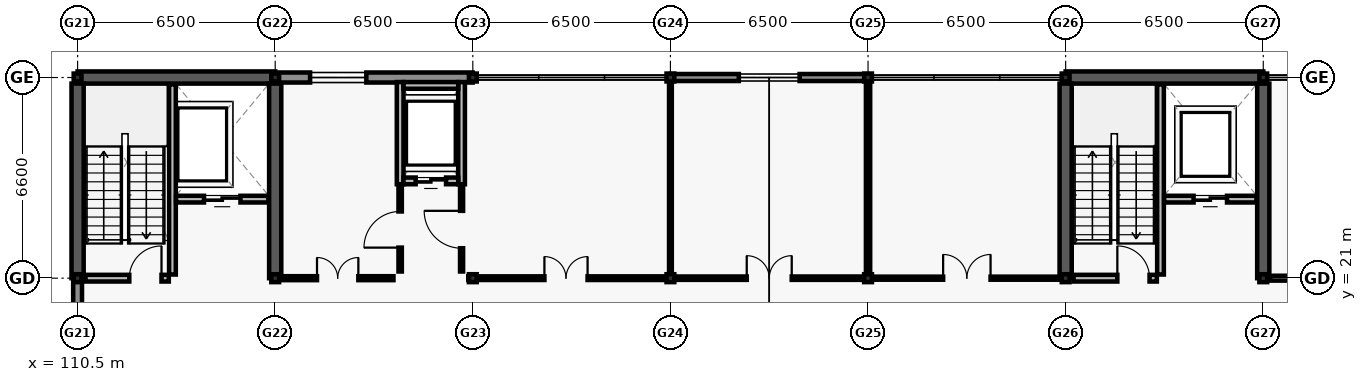
"""IFC4 building model, lengths in metres.
Left out: names, types, materials, properties, quantities, classifications, styles, units other than length and angle.
Written with IfcOpenShell. Run it as: python <this file> out.ifc"""

import sys

from ifc_helpers import new_model, si_unit, direction, frame, frame_2d, origin, origin_2d, place, context, subcontext, project, spatial, rectangle, i_section, extrude, element, fill, save


model = new_model("IFC4")
c1 = context("Model", 3, precision=1e-05, world=origin(), true_north=direction((0.0, 1.0)))
c2 = subcontext(c1, "Body", "Model", "MODEL_VIEW")
j1 = project(units=[si_unit("LENGTHUNIT", "METRE"), si_unit("PLANEANGLEUNIT", "RADIAN")], contexts=[c1])
p1 = place(None, origin())
s1 = spatial("IfcSite", under=j1, at=p1, CompositionType="ELEMENT")
p2 = place(p1, origin())
s2 = spatial("IfcBuilding", under=s1, at=p2, CompositionType="ELEMENT")
p3 = place(p2, frame((0.0, 0.0, 17.4)))
s3 = spatial("IfcBuildingStorey", under=s2, at=p3, CompositionType="ELEMENT", Elevation=17.4)
for number, where, z_axis, x_axis in (
    (1, (110.5, 21.0, 0.0), (0.0, 0.0, 1.0), (1.0, 0.0, 0.0)),
    (2, (110.5, 27.6, 0.0), (0.0, 0.0, 1.0), (1.0, 0.0, 0.0)),
    (3, (117.0, 21.0, 0.0), (0.0, 0.0, 1.0), (1.0, 0.0, 0.0)),
    (4, (117.0, 27.6, 0.0), (0.0, 0.0, 1.0), (1.0, 0.0, 0.0)),
    (5, (123.5, 21.0, 0.0), (0.0, 0.0, 1.0), (1.0, 0.0, 0.0)),
    (6, (123.5, 27.6, 0.0), (0.0, 0.0, 1.0), (1.0, 0.0, 0.0)),
    (7, (130.0, 21.0, 0.0), (0.0, 0.0, 1.0), (1.0, 0.0, 0.0)),
    (8, (130.0, 27.6, 0.0), (0.0, 0.0, 1.0), (1.0, 0.0, 0.0)),
    (9, (136.5, 21.0, 0.0), (0.0, 0.0, 1.0), (1.0, 0.0, 0.0)),
    (10, (136.5, 27.6, 0.0), (0.0, 0.0, 1.0), (1.0, 0.0, 0.0)),
    (11, (143.0, 21.0, 0.0), (0.0, 0.0, 1.0), (1.0, 0.0, 0.0)),
    (12, (143.0, 27.6, 0.0), (0.0, 0.0, 1.0), (1.0, 0.0, 0.0)),
    (13, (149.5, 21.0, 0.0), (0.0, 0.0, 1.0), (1.0, 0.0, 0.0)),
    (14, (149.5, 27.6, 0.0), (0.0, 0.0, 1.0), (1.0, 0.0, 0.0)),
):
    element("IfcColumn", number, at=place(p3, frame(where, z_axis=z_axis, x_axis=x_axis)), inside=s3, PredefinedType="COLUMN", context=c2, shape_type="SweptSolid", body=[
        extrude(i_section(OverallWidth=0.256, OverallDepth=0.26, WebThickness=0.01, FlangeThickness=0.017, FilletRadius=0.013, at=origin_2d()), origin(), (0.0, 0.0, 1.0), 3.9),
    ])
p4 = place(p3, frame((110.5, 27.6, 0.0), z_axis=(0.0, 0.0, 1.0), x_axis=(1.0, 0.0, 0.0)))
e15 = element("IfcWall", 15, at=p4, inside=s3, PredefinedType="SHEAR", context=c2, shape_type="SweptSolid", body=[
    extrude(rectangle(XDim=6.5, YDim=0.4, at=frame_2d((3.25, 0.0))), origin(), (0.0, 0.0, 1.0), 3.66),
])
for number, where, z_axis, x_axis in (
    (16, (110.5, 21.0, 0.0), (0.0, 0.0, 1.0), (0.0, 1.0, 0.0)),
    (17, (117.0, 21.0, 0.0), (0.0, 0.0, 1.0), (0.0, 1.0, 0.0)),
):
    element("IfcWall", number, at=place(p3, frame(where, z_axis=z_axis, x_axis=x_axis)), inside=s3, PredefinedType="SHEAR", context=c2, shape_type="SweptSolid", body=[
        extrude(rectangle(XDim=6.4, YDim=0.4, at=frame_2d((3.2, 0.0))), origin(), (0.0, 0.0, 1.0), 3.66),
    ])
p5 = place(p3, frame((143.0, 27.6, 0.0), z_axis=(0.0, 0.0, 1.0), x_axis=(1.0, 0.0, 0.0)))
e18 = element("IfcWall", 18, at=p5, inside=s3, PredefinedType="SHEAR", context=c2, shape_type="SweptSolid", body=[
    extrude(rectangle(XDim=6.5, YDim=0.4, at=frame_2d((3.25, 0.0))), origin(), (0.0, 0.0, 1.0), 3.66),
])
for number, where, z_axis, x_axis in (
    (19, (143.0, 21.0, 0.0), (0.0, 0.0, 1.0), (0.0, 1.0, 0.0)),
    (20, (149.5, 21.0, 0.0), (0.0, 0.0, 1.0), (0.0, 1.0, 0.0)),
):
    element("IfcWall", number, at=place(p3, frame(where, z_axis=z_axis, x_axis=x_axis)), inside=s3, PredefinedType="SHEAR", context=c2, shape_type="SweptSolid", body=[
        extrude(rectangle(XDim=6.4, YDim=0.4, at=frame_2d((3.2, 0.0))), origin(), (0.0, 0.0, 1.0), 3.66),
    ])
p6 = place(p3, frame((117.005, 27.6, 0.0), z_axis=(0.0, 0.0, 1.0), x_axis=(1.0, 0.0, 0.0)))
e21 = element("IfcWall", 21, at=p6, inside=s3, PredefinedType="SOLIDWALL", context=c2, shape_type="SweptSolid", body=[
    extrude(rectangle(XDim=6.49, YDim=0.33, at=frame_2d((3.245, 0.0))), origin(), (0.0, 0.0, 1.0), 3.02),
])
p7 = place(p6, frame((1.143, 0.0, 0.8)))
e22 = element("IfcOpeningElement", 22, at=p7, cuts=e21, PredefinedType="OPENING", context=c2, shape_type="SweptSolid", body=[
    extrude(rectangle(XDim=1.85, YDim=1.55, at=frame_2d((0.925, 0.775))), frame((0.0, 0.175, 0.0), z_axis=(0.0, -1.0, 0.0), x_axis=(1.0, 0.0, 0.0)), (0.0, 0.0, 1.0), 0.35),
])
p8 = place(p3, frame((130.005, 27.6, 0.0), z_axis=(0.0, 0.0, 1.0), x_axis=(1.0, 0.0, 0.0)))
e23 = element("IfcWall", 23, at=p8, inside=s3, PredefinedType="SOLIDWALL", context=c2, shape_type="SweptSolid", body=[
    extrude(rectangle(XDim=6.49, YDim=0.23, at=frame_2d((3.245, 0.0))), origin(), (0.0, 0.0, 1.0), 3.02),
])
p9 = place(p8, frame((2.245, 0.0, 0.8)))
e24 = element("IfcOpeningElement", 24, at=p9, cuts=e23, PredefinedType="OPENING", context=c2, shape_type="SweptSolid", body=[
    extrude(rectangle(XDim=2.0, YDim=1.55, at=frame_2d((1.0, 0.775))), frame((0.0, 0.125, 0.0), z_axis=(0.0, -1.0, 0.0), x_axis=(1.0, 0.0, 0.0)), (0.0, 0.0, 1.0), 0.25),
])
p10 = place(p3, frame((110.5, 14.405, 0.0), z_axis=(0.0, 0.0, 1.0), x_axis=(0.0, 1.0, 0.0)))
e25 = element("IfcWall", 25, at=p10, inside=s3, PredefinedType="SOLIDWALL", context=c2, shape_type="SweptSolid", body=[
    extrude(rectangle(XDim=6.59, YDim=0.29, at=frame_2d((3.295, 0.0))), origin(), (0.0, 0.0, 1.0), 3.02),
])
p11 = place(p10, frame((0.762, 0.0, 0.8)))
e26 = element("IfcOpeningElement", 26, at=p11, cuts=e25, PredefinedType="OPENING", context=c2, shape_type="SweptSolid", body=[
    extrude(rectangle(XDim=2.3, YDim=1.55, at=frame_2d((1.15, 0.775))), frame((0.0, 0.155, 0.0), z_axis=(0.0, -1.0, 0.0), x_axis=(1.0, 0.0, 0.0)), (0.0, 0.0, 1.0), 0.31),
])
p12 = place(p3, frame((113.62, 21.12, 0.0), z_axis=(0.0, 0.0, 1.0), x_axis=(0.0, 1.0, 0.0)))
e27 = element("IfcWall", 27, at=p12, inside=s3, PredefinedType="SOLIDWALL", context=c2, shape_type="SweptSolid", body=[
    extrude(rectangle(XDim=6.255, YDim=0.22, at=frame_2d((3.127, 0.0))), origin(), (0.0, 0.0, 1.0), 3.66),
])
p13 = place(p3, frame((110.76, 21.0, 0.0), z_axis=(0.0, 0.0, 1.0), x_axis=(1.0, 0.0, 0.0)))
e28 = element("IfcWall", 28, at=p13, inside=s3, PredefinedType="SOLIDWALL", context=c2, shape_type="SweptSolid", body=[
    extrude(rectangle(XDim=2.74, YDim=0.22, at=frame_2d((1.37, 0.0))), origin(), (0.0, 0.0, 1.0), 3.02),
])
p14 = place(p13, frame((1.44, 0.0, 0.0)))
e29 = element("IfcOpeningElement", 29, at=p14, cuts=e28, PredefinedType="OPENING", context=c2, shape_type="SweptSolid", body=[
    extrude(rectangle(XDim=1.06, YDim=2.1, at=frame_2d((0.53, 1.05))), frame((0.0, 0.12, 0.0), z_axis=(0.0, -1.0, 0.0), x_axis=(1.0, 0.0, 0.0)), (0.0, 0.0, 1.0), 0.24),
])
p15 = place(p3, frame((113.74, 23.6, 0.0), z_axis=(0.0, 0.0, 1.0), x_axis=(1.0, 0.0, 0.0)))
e30 = element("IfcWall", 30, at=p15, inside=s3, PredefinedType="SOLIDWALL", context=c2, shape_type="SweptSolid", body=[
    extrude(rectangle(XDim=3.035, YDim=0.22, at=frame_2d((1.518, 0.0))), origin(), (0.0, 0.0, 1.0), 3.66),
])
p16 = place(p15, frame((0.917, 0.0, 0.0)))
e31 = element("IfcOpeningElement", 31, at=p16, cuts=e30, PredefinedType="OPENING", context=c2, shape_type="SweptSolid", body=[
    extrude(rectangle(XDim=1.2, YDim=2.15, at=frame_2d((0.6, 1.075))), frame((0.0, 0.12, 0.0), z_axis=(0.0, -1.0, 0.0), x_axis=(1.0, 0.0, 0.0)), (0.0, 0.0, 1.0), 0.24),
])
for number, where, z_axis, x_axis in (
    (32, (121.11, 24.09, 0.0), (0.0, 0.0, 1.0), (0.0, 1.0, 0.0)),
    (33, (123.13, 24.09, 0.0), (0.0, 0.0, 1.0), (0.0, 1.0, 0.0)),
):
    element("IfcWall", number, at=place(p3, frame(where, z_axis=z_axis, x_axis=x_axis)), inside=s3, PredefinedType="SOLIDWALL", context=c2, shape_type="SweptSolid", body=[
        extrude(rectangle(XDim=3.36, YDim=0.22, at=frame_2d((1.68, 0.0))), origin(), (0.0, 0.0, 1.0), 3.66),
    ])
p17 = place(p3, frame((121.22, 27.34, 0.0), z_axis=(0.0, 0.0, 1.0), x_axis=(1.0, 0.0, 0.0)))
e34 = element("IfcWall", 34, at=p17, inside=s3, PredefinedType="SOLIDWALL", context=c2, shape_type="SweptSolid", body=[
    extrude(rectangle(XDim=1.8, YDim=0.22, at=frame_2d((0.9, 0.0))), origin(), (0.0, 0.0, 1.0), 3.66),
])
p18 = place(p3, frame((121.22, 24.2, 0.0), z_axis=(0.0, 0.0, 1.0), x_axis=(1.0, 0.0, 0.0)))
e35 = element("IfcWall", 35, at=p18, inside=s3, PredefinedType="SOLIDWALL", context=c2, shape_type="SweptSolid", body=[
    extrude(rectangle(XDim=1.8, YDim=0.22, at=frame_2d((0.9, 0.0))), origin(), (0.0, 0.0, 1.0), 3.66),
])
p19 = place(p18, frame((0.4, 0.0, 0.0)))
e36 = element("IfcOpeningElement", 36, at=p19, cuts=e35, PredefinedType="OPENING", context=c2, shape_type="SweptSolid", body=[
    extrude(rectangle(XDim=1.0, YDim=2.1, at=frame_2d((0.5, 1.05))), frame((0.0, 0.12, 0.0), z_axis=(0.0, -1.0, 0.0), x_axis=(1.0, 0.0, 0.0)), (0.0, 0.0, 1.0), 0.24),
])
p20 = place(p3, frame((146.12, 21.12, 0.0), z_axis=(0.0, 0.0, 1.0), x_axis=(0.0, 1.0, 0.0)))
e37 = element("IfcWall", 37, at=p20, inside=s3, PredefinedType="SOLIDWALL", context=c2, shape_type="SweptSolid", body=[
    extrude(rectangle(XDim=6.255, YDim=0.22, at=frame_2d((3.127, 0.0))), origin(), (0.0, 0.0, 1.0), 3.66),
])
p21 = place(p3, frame((143.26, 21.0, 0.0), z_axis=(0.0, 0.0, 1.0), x_axis=(1.0, 0.0, 0.0)))
e38 = element("IfcWall", 38, at=p21, inside=s3, PredefinedType="SOLIDWALL", context=c2, shape_type="SweptSolid", body=[
    extrude(rectangle(XDim=2.74, YDim=0.22, at=frame_2d((1.37, 0.0))), origin(), (0.0, 0.0, 1.0), 3.02),
])
p22 = place(p21, frame((1.44, 0.0, 0.0)))
e39 = element("IfcOpeningElement", 39, at=p22, cuts=e38, PredefinedType="OPENING", context=c2, shape_type="SweptSolid", body=[
    extrude(rectangle(XDim=1.06, YDim=2.1, at=frame_2d((0.53, 1.05))), frame((0.0, 0.12, 0.0), z_axis=(0.0, -1.0, 0.0), x_axis=(1.0, 0.0, 0.0)), (0.0, 0.0, 1.0), 0.24),
])
p23 = place(p3, frame((146.24, 23.6, 0.0), z_axis=(0.0, 0.0, 1.0), x_axis=(1.0, 0.0, 0.0)))
e40 = element("IfcWall", 40, at=p23, inside=s3, PredefinedType="SOLIDWALL", context=c2, shape_type="SweptSolid", body=[
    extrude(rectangle(XDim=3.035, YDim=0.22, at=frame_2d((1.518, 0.0))), origin(), (0.0, 0.0, 1.0), 3.66),
])
p24 = place(p23, frame((0.968, 0.0, 0.0)))
e41 = element("IfcOpeningElement", 41, at=p24, cuts=e40, PredefinedType="OPENING", context=c2, shape_type="SweptSolid", body=[
    extrude(rectangle(XDim=1.1, YDim=2.1, at=frame_2d((0.55, 1.05))), frame((0.0, 0.12, 0.0), z_axis=(0.0, -1.0, 0.0), x_axis=(1.0, 0.0, 0.0)), (0.0, 0.0, 1.0), 0.24),
])
p25 = place(p3, frame((121.11, 21.22, 0.0), z_axis=(0.0, 0.0, 1.0), x_axis=(0.0, 1.0, 0.0)))
e42 = element("IfcWall", 42, at=p25, inside=s3, PredefinedType="PARTITIONING", context=c2, shape_type="SweptSolid", body=[
    extrude(rectangle(XDim=2.76, YDim=0.11, at=frame_2d((1.38, 0.0))), origin(), (0.0, 0.0, 1.0), 3.0),
])
p26 = place(p25, frame((0.785, 0.0, 0.0)))
e43 = element("IfcOpeningElement", 43, at=p26, cuts=e42, PredefinedType="OPENING", context=c2, shape_type="SweptSolid", body=[
    extrude(rectangle(XDim=1.19, YDim=2.14, at=frame_2d((0.595, 1.07))), frame((0.0, 0.065, 0.0), z_axis=(0.0, -1.0, 0.0), x_axis=(1.0, 0.0, 0.0)), (0.0, 0.0, 1.0), 0.13),
])
p27 = place(p3, frame((123.13, 21.22, 0.0), z_axis=(0.0, 0.0, 1.0), x_axis=(0.0, 1.0, 0.0)))
e44 = element("IfcWall", 44, at=p27, inside=s3, PredefinedType="PARTITIONING", context=c2, shape_type="SweptSolid", body=[
    extrude(rectangle(XDim=2.76, YDim=0.1, at=frame_2d((1.38, 0.0))), origin(), (0.0, 0.0, 1.0), 3.0),
])
p28 = place(p27, frame((0.765, 0.0, 0.0)))
e45 = element("IfcOpeningElement", 45, at=p28, cuts=e44, PredefinedType="OPENING", context=c2, shape_type="SweptSolid", body=[
    extrude(rectangle(XDim=1.23, YDim=2.08, at=frame_2d((0.615, 1.04))), frame((0.0, 0.06, 0.0), z_axis=(0.0, -1.0, 0.0), x_axis=(1.0, 0.0, 0.0)), (0.0, 0.0, 1.0), 0.12),
])
p29 = place(p3, frame((117.22, 21.0, 0.0), z_axis=(0.0, 0.0, 1.0), x_axis=(1.0, 0.0, 0.0)))
e46 = element("IfcWall", 46, at=p29, inside=s3, PredefinedType="PARTITIONING", context=c2, shape_type="SweptSolid", body=[
    extrude(rectangle(XDim=3.67, YDim=0.13, at=frame_2d((1.835, 0.0))), origin(), (0.0, 0.0, 1.0), 3.0),
])
p30 = place(p29, frame((1.155, 0.0, 0.0)))
e47 = element("IfcOpeningElement", 47, at=p30, cuts=e46, PredefinedType="OPENING", context=c2, shape_type="SweptSolid", body=[
    extrude(rectangle(XDim=1.36, YDim=2.15, at=frame_2d((0.68, 1.075))), frame((0.0, 0.075, 0.0), z_axis=(0.0, -1.0, 0.0), x_axis=(1.0, 0.0, 0.0)), (0.0, 0.0, 1.0), 0.15),
])
p31 = place(p3, frame((123.35, 21.0, 0.0), z_axis=(0.0, 0.0, 1.0), x_axis=(1.0, 0.0, 0.0)))
e48 = element("IfcWall", 48, at=p31, inside=s3, PredefinedType="PARTITIONING", context=c2, shape_type="SweptSolid", body=[
    extrude(rectangle(XDim=6.43, YDim=0.12, at=frame_2d((3.215, 0.0))), origin(), (0.0, 0.0, 1.0), 3.0),
])
p32 = place(p31, frame((2.505, 0.0, 0.0)))
e49 = element("IfcOpeningElement", 49, at=p32, cuts=e48, PredefinedType="OPENING", context=c2, shape_type="SweptSolid", body=[
    extrude(rectangle(XDim=1.42, YDim=2.15, at=frame_2d((0.71, 1.075))), frame((0.0, 0.07, 0.0), z_axis=(0.0, -1.0, 0.0), x_axis=(1.0, 0.0, 0.0)), (0.0, 0.0, 1.0), 0.14),
])
p33 = place(p3, frame((130.22, 21.0, 0.0), z_axis=(0.0, 0.0, 1.0), x_axis=(1.0, 0.0, 0.0)))
e50 = element("IfcWall", 50, at=p33, inside=s3, PredefinedType="PARTITIONING", context=c2, shape_type="SweptSolid", body=[
    extrude(rectangle(XDim=6.06, YDim=0.11, at=frame_2d((3.03, 0.0))), origin(), (0.0, 0.0, 1.0), 3.0),
])
p34 = place(p33, frame((2.29, 0.0, 0.0)))
e51 = element("IfcOpeningElement", 51, at=p34, cuts=e50, PredefinedType="OPENING", context=c2, shape_type="SweptSolid", body=[
    extrude(rectangle(XDim=1.48, YDim=2.18, at=frame_2d((0.74, 1.09))), frame((0.0, 0.065, 0.0), z_axis=(0.0, -1.0, 0.0), x_axis=(1.0, 0.0, 0.0)), (0.0, 0.0, 1.0), 0.13),
])
p35 = place(p3, frame((136.72, 21.0, 0.0), z_axis=(0.0, 0.0, 1.0), x_axis=(1.0, 0.0, 0.0)))
e52 = element("IfcWall", 52, at=p35, inside=s3, PredefinedType="PARTITIONING", context=c2, shape_type="SweptSolid", body=[
    extrude(rectangle(XDim=6.06, YDim=0.1, at=frame_2d((3.03, 0.0))), origin(), (0.0, 0.0, 1.0), 3.0),
])
p36 = place(p35, frame((2.25, 0.0, 0.0)))
e53 = element("IfcOpeningElement", 53, at=p36, cuts=e52, PredefinedType="OPENING", context=c2, shape_type="SweptSolid", body=[
    extrude(rectangle(XDim=1.56, YDim=2.18, at=frame_2d((0.78, 1.09))), frame((0.0, 0.06, 0.0), z_axis=(0.0, -1.0, 0.0), x_axis=(1.0, 0.0, 0.0)), (0.0, 0.0, 1.0), 0.12),
])
p37 = place(p3, frame((149.72, 21.0, 0.0), z_axis=(0.0, 0.0, 1.0), x_axis=(1.0, 0.0, 0.0)))
e54 = element("IfcWall", 54, at=p37, inside=s3, PredefinedType="PARTITIONING", context=c2, shape_type="SweptSolid", body=[
    extrude(rectangle(XDim=6.06, YDim=0.16, at=frame_2d((3.03, 0.0))), origin(), (0.0, 0.0, 1.0), 3.0),
])
p38 = place(p37, frame((2.21, 0.0, 0.0)))
e55 = element("IfcOpeningElement", 55, at=p38, cuts=e54, PredefinedType="OPENING", context=c2, shape_type="SweptSolid", body=[
    extrude(rectangle(XDim=1.64, YDim=2.2, at=frame_2d((0.82, 1.1))), frame((0.0, 0.09, 0.0), z_axis=(0.0, -1.0, 0.0), x_axis=(1.0, 0.0, 0.0)), (0.0, 0.0, 1.0), 0.18),
])
p39 = place(p3, frame((130.0, 21.22, 0.0), z_axis=(0.0, 0.0, 1.0), x_axis=(0.0, 1.0, 0.0)))
e56 = element("IfcWall", 56, at=p39, inside=s3, PredefinedType="MOVABLE", context=c2, shape_type="SweptSolid", body=[
    extrude(rectangle(XDim=6.16, YDim=0.09, at=frame_2d((3.08, 0.0))), origin(), (0.0, 0.0, 1.0), 3.0),
])
p40 = place(p3, frame((136.5, 21.22, 0.0), z_axis=(0.0, 0.0, 1.0), x_axis=(0.0, 1.0, 0.0)))
e57 = element("IfcWall", 57, at=p40, inside=s3, PredefinedType="PARTITIONING", context=c2, shape_type="SweptSolid", body=[
    extrude(rectangle(XDim=6.16, YDim=0.14, at=frame_2d((3.08, 0.0))), origin(), (0.0, 0.0, 1.0), 3.0),
])
p41 = place(p7, origin())
e58 = element("IfcWindow", 58, at=p41, inside=s3, PartitioningType="DOUBLE_PANEL_VERTICAL", PredefinedType="WINDOW", context=c2, shape_type="SweptSolid", body=[
    extrude(rectangle(XDim=1.85, YDim=1.55, at=frame_2d((0.925, 0.775))), frame((0.0, 0.03, 0.0), z_axis=(0.0, -1.0, 0.0), x_axis=(1.0, 0.0, 0.0)), (0.0, 0.0, 1.0), 0.06),
])
fill(e22, e58)
p42 = place(p9, origin())
e59 = element("IfcWindow", 59, at=p42, inside=s3, PartitioningType="DOUBLE_PANEL_VERTICAL", PredefinedType="WINDOW", context=c2, shape_type="SweptSolid", body=[
    extrude(rectangle(XDim=2.0, YDim=1.55, at=frame_2d((1.0, 0.775))), frame((0.0, 0.03, 0.0), z_axis=(0.0, -1.0, 0.0), x_axis=(1.0, 0.0, 0.0)), (0.0, 0.0, 1.0), 0.06),
])
fill(e24, e59)
p43 = place(p14, origin())
e60 = element("IfcDoor", 60, at=p43, inside=s3, OperationType="SINGLE_SWING_RIGHT", PredefinedType="DOOR", context=c2, shape_type="SweptSolid", body=[
    extrude(rectangle(XDim=1.06, YDim=2.1, at=frame_2d((0.53, 1.05))), frame((0.0, 0.025, 0.0), z_axis=(0.0, -1.0, 0.0), x_axis=(1.0, 0.0, 0.0)), (0.0, 0.0, 1.0), 0.05),
])
fill(e29, e60)
p44 = place(p16, origin())
e61 = element("IfcDoor", 61, at=p44, inside=s3, OperationType="DOUBLE_DOOR_SLIDING", PredefinedType="DOOR", context=c2, shape_type="SweptSolid", body=[
    extrude(rectangle(XDim=1.2, YDim=2.15, at=frame_2d((0.6, 1.075))), frame((0.0, 0.025, 0.0), z_axis=(0.0, -1.0, 0.0), x_axis=(1.0, 0.0, 0.0)), (0.0, 0.0, 1.0), 0.05),
])
fill(e31, e61)
p45 = place(p19, origin())
e62 = element("IfcDoor", 62, at=p45, inside=s3, OperationType="DOUBLE_DOOR_SLIDING", PredefinedType="DOOR", context=c2, shape_type="SweptSolid", body=[
    extrude(rectangle(XDim=1.0, YDim=2.1, at=frame_2d((0.5, 1.05))), frame((0.0, 0.025, 0.0), z_axis=(0.0, -1.0, 0.0), x_axis=(1.0, 0.0, 0.0)), (0.0, 0.0, 1.0), 0.05),
])
fill(e36, e62)
p46 = place(p22, origin())
e63 = element("IfcDoor", 63, at=p46, inside=s3, OperationType="SINGLE_SWING_LEFT", PredefinedType="DOOR", context=c2, shape_type="SweptSolid", body=[
    extrude(rectangle(XDim=1.06, YDim=2.1, at=frame_2d((0.53, 1.05))), frame((0.0, 0.025, 0.0), z_axis=(0.0, -1.0, 0.0), x_axis=(1.0, 0.0, 0.0)), (0.0, 0.0, 1.0), 0.05),
])
fill(e39, e63)
p47 = place(p24, origin())
e64 = element("IfcDoor", 64, at=p47, inside=s3, OperationType="DOUBLE_DOOR_SLIDING", PredefinedType="DOOR", context=c2, shape_type="SweptSolid", body=[
    extrude(rectangle(XDim=1.1, YDim=2.1, at=frame_2d((0.55, 1.05))), frame((0.0, 0.025, 0.0), z_axis=(0.0, -1.0, 0.0), x_axis=(1.0, 0.0, 0.0)), (0.0, 0.0, 1.0), 0.05),
])
fill(e41, e64)
p48 = place(p26, origin())
e65 = element("IfcDoor", 65, at=p48, inside=s3, OperationType="SINGLE_SWING_LEFT", PredefinedType="DOOR", context=c2, shape_type="SweptSolid", body=[
    extrude(rectangle(XDim=1.19, YDim=2.14, at=frame_2d((0.595, 1.07))), frame((0.0, 0.025, 0.0), z_axis=(0.0, -1.0, 0.0), x_axis=(1.0, 0.0, 0.0)), (0.0, 0.0, 1.0), 0.05),
])
fill(e43, e65)
p49 = place(p28, origin())
e66 = element("IfcDoor", 66, at=p49, inside=s3, OperationType="SINGLE_SWING_RIGHT", PredefinedType="DOOR", context=c2, shape_type="SweptSolid", body=[
    extrude(rectangle(XDim=1.23, YDim=2.08, at=frame_2d((0.615, 1.04))), frame((0.0, 0.025, 0.0), z_axis=(0.0, -1.0, 0.0), x_axis=(1.0, 0.0, 0.0)), (0.0, 0.0, 1.0), 0.05),
])
fill(e45, e66)
p50 = place(p30, origin())
e67 = element("IfcDoor", 67, at=p50, inside=s3, OperationType="DOUBLE_DOOR_SINGLE_SWING", PredefinedType="DOOR", context=c2, shape_type="SweptSolid", body=[
    extrude(rectangle(XDim=1.36, YDim=2.15, at=frame_2d((0.68, 1.075))), frame((0.0, 0.025, 0.0), z_axis=(0.0, -1.0, 0.0), x_axis=(1.0, 0.0, 0.0)), (0.0, 0.0, 1.0), 0.05),
])
fill(e47, e67)
p51 = place(p32, origin())
e68 = element("IfcDoor", 68, at=p51, inside=s3, OperationType="DOUBLE_DOOR_SINGLE_SWING", PredefinedType="DOOR", context=c2, shape_type="SweptSolid", body=[
    extrude(rectangle(XDim=1.42, YDim=2.15, at=frame_2d((0.71, 1.075))), frame((0.0, 0.025, 0.0), z_axis=(0.0, -1.0, 0.0), x_axis=(1.0, 0.0, 0.0)), (0.0, 0.0, 1.0), 0.05),
])
fill(e49, e68)
p52 = place(p34, origin())
e69 = element("IfcDoor", 69, at=p52, inside=s3, OperationType="DOUBLE_DOOR_SINGLE_SWING", PredefinedType="DOOR", context=c2, shape_type="SweptSolid", body=[
    extrude(rectangle(XDim=1.48, YDim=2.18, at=frame_2d((0.74, 1.09))), frame((0.0, 0.025, 0.0), z_axis=(0.0, -1.0, 0.0), x_axis=(1.0, 0.0, 0.0)), (0.0, 0.0, 1.0), 0.05),
])
fill(e51, e69)
p53 = place(p36, origin())
e70 = element("IfcDoor", 70, at=p53, inside=s3, OperationType="DOUBLE_DOOR_SINGLE_SWING", PredefinedType="DOOR", context=c2, shape_type="SweptSolid", body=[
    extrude(rectangle(XDim=1.56, YDim=2.18, at=frame_2d((0.78, 1.09))), frame((0.0, 0.025, 0.0), z_axis=(0.0, -1.0, 0.0), x_axis=(1.0, 0.0, 0.0)), (0.0, 0.0, 1.0), 0.05),
])
fill(e53, e70)
save(model, sys.argv[1])
